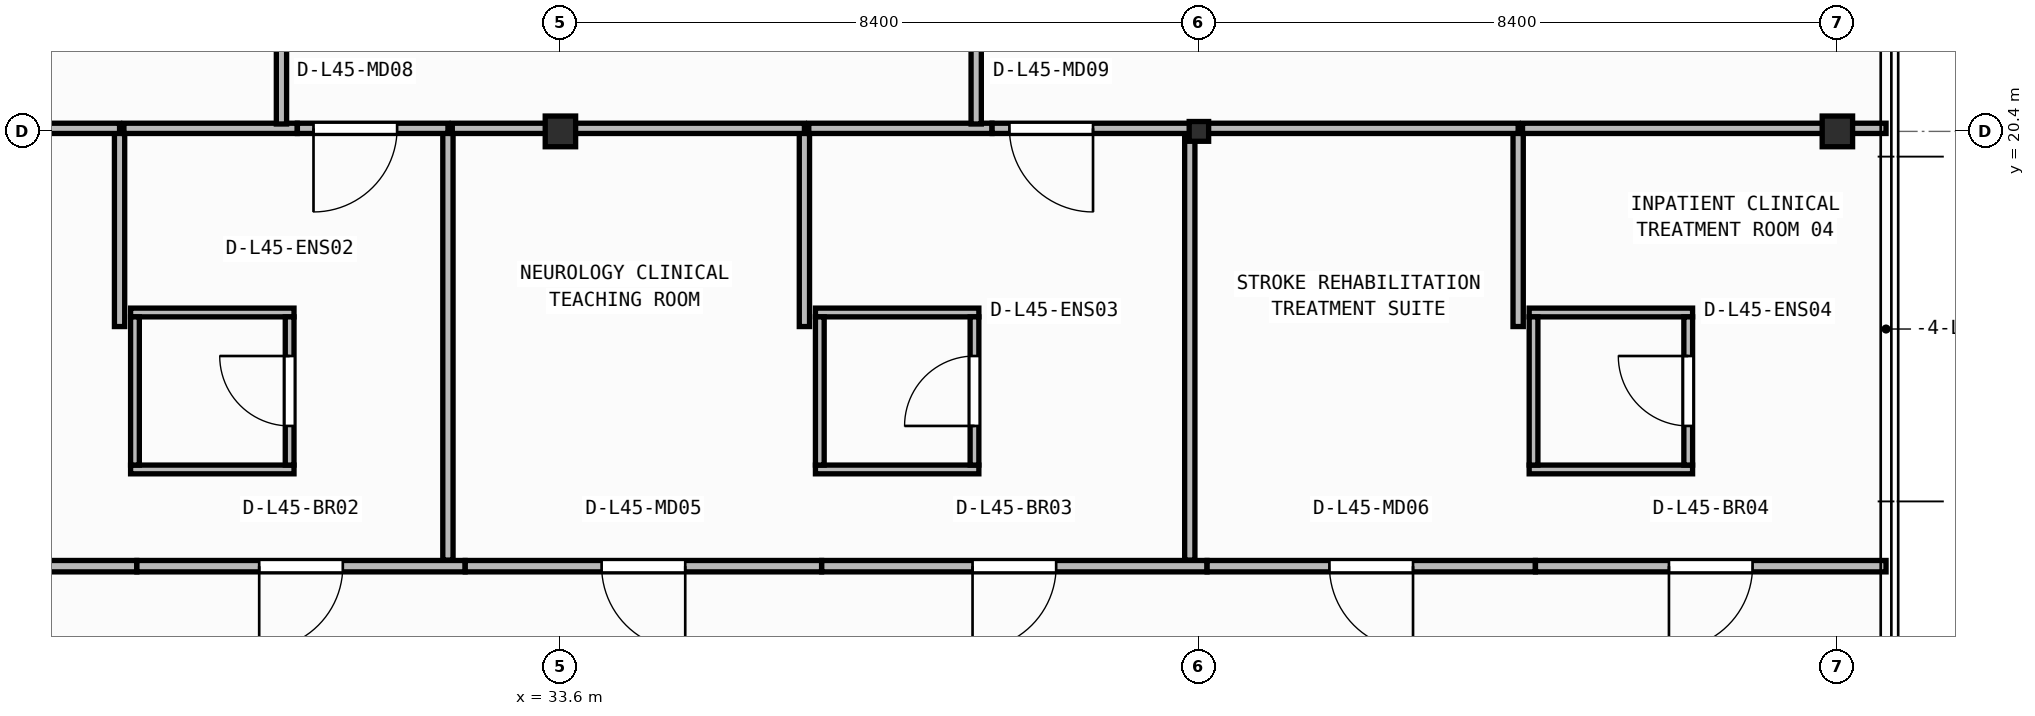
"""IFC4 building model, lengths in metres.
Left out: names, types, materials, properties, quantities, classifications, styles, units other than length and angle.
Written with IfcOpenShell. Run it as: python <this file> out.ifc"""

import sys

from ifc_helpers import new_model, si_unit, direction, frame, frame_2d, origin, origin_2d, place, context, subcontext, project, spatial, rectangle, i_section, extrude, element, fill, save


model = new_model("IFC4")
c1 = context("Model", 3, precision=1e-05, world=origin(), true_north=direction((0.0, 1.0)))
c2 = subcontext(c1, "Body", "Model", "MODEL_VIEW")
j1 = project(units=[si_unit("LENGTHUNIT", "METRE"), si_unit("PLANEANGLEUNIT", "RADIAN")], contexts=[c1])
p1 = place(None, origin())
s1 = spatial("IfcSite", under=j1, at=p1, CompositionType="ELEMENT")
p2 = place(p1, origin())
s2 = spatial("IfcBuilding", under=s1, at=p2, CompositionType="ELEMENT")
p3 = place(p2, frame((0.0, 0.0, 184.2)))
s3 = spatial("IfcBuildingStorey", under=s2, at=p3, CompositionType="ELEMENT", Elevation=184.2)
p4 = place(p3, frame((33.6, 20.4, 0.0), z_axis=(0.0, 0.0, 1.0), x_axis=(1.0, 0.0, 0.0)))
e1 = element("IfcColumn", 1, at=p4, inside=s3, PredefinedType="COLUMN", context=c2, shape_type="SweptSolid", body=[
    extrude(i_section(OverallWidth=0.4, OverallDepth=0.404, WebThickness=0.02, FlangeThickness=0.032, at=origin_2d()), origin(), (0.0, 0.0, 1.0), 3.95),
])
p5 = place(p3, frame((42.0, 20.4, 0.0), z_axis=(0.0, 0.0, 1.0), x_axis=(1.0, 0.0, 0.0)))
e2 = element("IfcColumn", 2, at=p5, inside=s3, PredefinedType="COLUMN", context=c2, shape_type="SweptSolid", body=[
    extrude(i_section(OverallWidth=0.256, OverallDepth=0.26, WebThickness=0.01, FlangeThickness=0.017, FilletRadius=0.013, at=origin_2d()), origin(), (0.0, 0.0, 1.0), 3.95),
])
p6 = place(p3, frame((50.4, 20.4, 0.0), z_axis=(0.0, 0.0, 1.0), x_axis=(1.0, 0.0, 0.0)))
e3 = element("IfcColumn", 3, at=p6, inside=s3, PredefinedType="COLUMN", context=c2, shape_type="SweptSolid", body=[
    extrude(i_section(OverallWidth=0.4, OverallDepth=0.404, WebThickness=0.02, FlangeThickness=0.032, at=origin_2d()), origin(), (0.0, 0.0, 1.0), 3.95),
])
p7 = place(p3, frame((27.945, 15.952, 0.0), z_axis=(0.0, 0.0, 1.0), x_axis=(1.0, 0.0, 0.0)))
e4 = element("IfcWall", 4, at=p7, inside=s3, PredefinedType="PARTITIONING", context=c2, shape_type="SweptSolid", body=[
    extrude(rectangle(XDim=2.15, YDim=0.115, at=frame_2d((1.075, 0.0))), origin(), (0.0, 0.0, 1.0), 3.381),
])
p8 = place(p3, frame((27.945, 18.018, 0.0), z_axis=(0.0, 0.0, 1.0), x_axis=(1.0, 0.0, 0.0)))
e5 = element("IfcWall", 5, at=p8, inside=s3, PredefinedType="PARTITIONING", context=c2, shape_type="SweptSolid", body=[
    extrude(rectangle(XDim=2.15, YDim=0.115, at=frame_2d((1.075, 0.0))), origin(), (0.0, 0.0, 1.0), 3.71),
])
p9 = place(p3, frame((28.002, 16.01, 0.0), z_axis=(0.0, 0.0, 1.0), x_axis=(0.0, 1.0, 0.0)))
e6 = element("IfcWall", 6, at=p9, inside=s3, PredefinedType="PARTITIONING", context=c2, shape_type="SweptSolid", body=[
    extrude(rectangle(XDim=1.95, YDim=0.115, at=frame_2d((0.975, 0.0))), origin(), (0.0, 0.0, 1.0), 3.71),
])
p10 = place(p3, frame((30.038, 16.01, 0.0), z_axis=(0.0, 0.0, 1.0), x_axis=(0.0, 1.0, 0.0)))
e7 = element("IfcWall", 7, at=p10, inside=s3, PredefinedType="PARTITIONING", context=c2, shape_type="SweptSolid", body=[
    extrude(rectangle(XDim=1.95, YDim=0.115, at=frame_2d((0.975, 0.0))), origin(), (0.0, 0.0, 1.0), 3.71),
])
p11 = place(p10, frame((0.515, 0.0, 0.0)))
e8 = element("IfcOpeningElement", 8, at=p11, cuts=e7, PredefinedType="OPENING", context=c2, shape_type="SweptSolid", body=[
    extrude(rectangle(XDim=0.92, YDim=2.1, at=frame_2d((0.46, 1.05))), frame((0.0, 0.067, 0.0), z_axis=(0.0, -1.0, 0.0), x_axis=(1.0, 0.0, 0.0)), (0.0, 0.0, 1.0), 0.135),
])
p12 = place(p3, frame((36.955, 15.952, 0.0), z_axis=(0.0, 0.0, 1.0), x_axis=(1.0, 0.0, 0.0)))
e9 = element("IfcWall", 9, at=p12, inside=s3, PredefinedType="PARTITIONING", context=c2, shape_type="SweptSolid", body=[
    extrude(rectangle(XDim=2.15, YDim=0.115, at=frame_2d((1.075, 0.0))), origin(), (0.0, 0.0, 1.0), 3.381),
])
p13 = place(p3, frame((36.955, 18.018, 0.0), z_axis=(0.0, 0.0, 1.0), x_axis=(1.0, 0.0, 0.0)))
e10 = element("IfcWall", 10, at=p13, inside=s3, PredefinedType="PARTITIONING", context=c2, shape_type="SweptSolid", body=[
    extrude(rectangle(XDim=2.15, YDim=0.115, at=frame_2d((1.075, 0.0))), origin(), (0.0, 0.0, 1.0), 3.71),
])
p14 = place(p3, frame((37.012, 16.01, 0.0), z_axis=(0.0, 0.0, 1.0), x_axis=(0.0, 1.0, 0.0)))
e11 = element("IfcWall", 11, at=p14, inside=s3, PredefinedType="PARTITIONING", context=c2, shape_type="SweptSolid", body=[
    extrude(rectangle(XDim=1.95, YDim=0.115, at=frame_2d((0.975, 0.0))), origin(), (0.0, 0.0, 1.0), 3.71),
])
p15 = place(p3, frame((39.048, 16.01, 0.0), z_axis=(0.0, 0.0, 1.0), x_axis=(0.0, 1.0, 0.0)))
e12 = element("IfcWall", 12, at=p15, inside=s3, PredefinedType="PARTITIONING", context=c2, shape_type="SweptSolid", body=[
    extrude(rectangle(XDim=1.95, YDim=0.115, at=frame_2d((0.975, 0.0))), origin(), (0.0, 0.0, 1.0), 3.71),
])
p16 = place(p15, frame((0.515, 0.0, 0.0)))
e13 = element("IfcOpeningElement", 13, at=p16, cuts=e12, PredefinedType="OPENING", context=c2, shape_type="SweptSolid", body=[
    extrude(rectangle(XDim=0.92, YDim=2.1, at=frame_2d((0.46, 1.05))), frame((0.0, 0.067, 0.0), z_axis=(0.0, -1.0, 0.0), x_axis=(1.0, 0.0, 0.0)), (0.0, 0.0, 1.0), 0.135),
])
p17 = place(p3, frame((46.345, 15.952, 0.0), z_axis=(0.0, 0.0, 1.0), x_axis=(1.0, 0.0, 0.0)))
e14 = element("IfcWall", 14, at=p17, inside=s3, PredefinedType="PARTITIONING", context=c2, shape_type="SweptSolid", body=[
    extrude(rectangle(XDim=2.15, YDim=0.115, at=frame_2d((1.075, 0.0))), origin(), (0.0, 0.0, 1.0), 3.381),
])
p18 = place(p3, frame((46.345, 18.018, 0.0), z_axis=(0.0, 0.0, 1.0), x_axis=(1.0, 0.0, 0.0)))
e15 = element("IfcWall", 15, at=p18, inside=s3, PredefinedType="PARTITIONING", context=c2, shape_type="SweptSolid", body=[
    extrude(rectangle(XDim=2.15, YDim=0.115, at=frame_2d((1.075, 0.0))), origin(), (0.0, 0.0, 1.0), 3.71),
])
p19 = place(p3, frame((46.403, 16.01, 0.0), z_axis=(0.0, 0.0, 1.0), x_axis=(0.0, 1.0, 0.0)))
e16 = element("IfcWall", 16, at=p19, inside=s3, PredefinedType="PARTITIONING", context=c2, shape_type="SweptSolid", body=[
    extrude(rectangle(XDim=1.95, YDim=0.115, at=frame_2d((0.975, 0.0))), origin(), (0.0, 0.0, 1.0), 3.71),
])
p20 = place(p3, frame((48.438, 16.01, 0.0), z_axis=(0.0, 0.0, 1.0), x_axis=(0.0, 1.0, 0.0)))
e17 = element("IfcWall", 17, at=p20, inside=s3, PredefinedType="PARTITIONING", context=c2, shape_type="SweptSolid", body=[
    extrude(rectangle(XDim=1.95, YDim=0.115, at=frame_2d((0.975, 0.0))), origin(), (0.0, 0.0, 1.0), 3.71),
])
p21 = place(p20, frame((0.515, 0.0, 0.0)))
e18 = element("IfcOpeningElement", 18, at=p21, cuts=e17, PredefinedType="OPENING", context=c2, shape_type="SweptSolid", body=[
    extrude(rectangle(XDim=0.92, YDim=2.1, at=frame_2d((0.46, 1.05))), frame((0.0, 0.067, 0.0), z_axis=(0.0, -1.0, 0.0), x_axis=(1.0, 0.0, 0.0)), (0.0, 0.0, 1.0), 0.135),
])
p22 = place(p3, frame((28.026, 14.68, 0.0), z_axis=(0.0, 0.0, 1.0), x_axis=(-1.0, 0.0, 0.0)))
e19 = element("IfcWall", 19, at=p22, inside=s3, PredefinedType="PARTITIONING", context=c2, shape_type="SweptSolid", body=[
    extrude(rectangle(XDim=5.068, YDim=0.15, at=frame_2d((2.534, 0.0))), origin(), (0.0, 0.0, 1.0), 3.71),
])
p23 = place(p22, frame((1.984, 0.0, 0.0)))
e20 = element("IfcOpeningElement", 20, at=p23, cuts=e19, PredefinedType="OPENING", context=c2, shape_type="SweptSolid", body=[
    extrude(rectangle(XDim=1.1, YDim=2.1, at=frame_2d((0.55, 1.05))), frame((0.0, 0.085, 0.0), z_axis=(0.0, -1.0, 0.0), x_axis=(1.0, 0.0, 0.0)), (0.0, 0.0, 1.0), 0.17),
])
p24 = place(p3, frame((32.346, 14.68, 0.0), z_axis=(0.0, 0.0, 1.0), x_axis=(-1.0, 0.0, 0.0)))
e21 = element("IfcWall", 21, at=p24, inside=s3, PredefinedType="PARTITIONING", context=c2, shape_type="SweptSolid", body=[
    extrude(rectangle(XDim=4.318, YDim=0.15, at=frame_2d((2.159, 0.0))), origin(), (0.0, 0.0, 1.0), 3.71),
])
p25 = place(p24, frame((1.609, 0.0, 0.0)))
e22 = element("IfcOpeningElement", 22, at=p25, cuts=e21, PredefinedType="OPENING", context=c2, shape_type="SweptSolid", body=[
    extrude(rectangle(XDim=1.1, YDim=2.1, at=frame_2d((0.55, 1.05))), frame((0.0, 0.085, 0.0), z_axis=(0.0, -1.0, 0.0), x_axis=(1.0, 0.0, 0.0)), (0.0, 0.0, 1.0), 0.17),
])
p26 = place(p3, frame((37.036, 14.68, 0.0), z_axis=(0.0, 0.0, 1.0), x_axis=(-1.0, 0.0, 0.0)))
e23 = element("IfcWall", 23, at=p26, inside=s3, PredefinedType="PARTITIONING", context=c2, shape_type="SweptSolid", body=[
    extrude(rectangle(XDim=4.688, YDim=0.15, at=frame_2d((2.344, 0.0))), origin(), (0.0, 0.0, 1.0), 3.71),
])
p27 = place(p26, frame((1.794, 0.0, 0.0)))
e24 = element("IfcOpeningElement", 24, at=p27, cuts=e23, PredefinedType="OPENING", context=c2, shape_type="SweptSolid", body=[
    extrude(rectangle(XDim=1.1, YDim=2.1, at=frame_2d((0.55, 1.05))), frame((0.0, 0.085, 0.0), z_axis=(0.0, -1.0, 0.0), x_axis=(1.0, 0.0, 0.0)), (0.0, 0.0, 1.0), 0.17),
])
p28 = place(p3, frame((42.106, 14.68, 0.0), z_axis=(0.0, 0.0, 1.0), x_axis=(-1.0, 0.0, 0.0)))
e25 = element("IfcWall", 25, at=p28, inside=s3, PredefinedType="PARTITIONING", context=c2, shape_type="SweptSolid", body=[
    extrude(rectangle(XDim=5.068, YDim=0.15, at=frame_2d((2.534, 0.0))), origin(), (0.0, 0.0, 1.0), 3.71),
])
p29 = place(p28, frame((1.984, 0.0, 0.0)))
e26 = element("IfcOpeningElement", 26, at=p29, cuts=e25, PredefinedType="OPENING", context=c2, shape_type="SweptSolid", body=[
    extrude(rectangle(XDim=1.1, YDim=2.1, at=frame_2d((0.55, 1.05))), frame((0.0, 0.085, 0.0), z_axis=(0.0, -1.0, 0.0), x_axis=(1.0, 0.0, 0.0)), (0.0, 0.0, 1.0), 0.17),
])
p30 = place(p3, frame((46.426, 14.68, 0.0), z_axis=(0.0, 0.0, 1.0), x_axis=(-1.0, 0.0, 0.0)))
e27 = element("IfcWall", 27, at=p30, inside=s3, PredefinedType="PARTITIONING", context=c2, shape_type="SweptSolid", body=[
    extrude(rectangle(XDim=4.318, YDim=0.15, at=frame_2d((2.159, 0.0))), origin(), (0.0, 0.0, 1.0), 3.71),
])
p31 = place(p30, frame((1.609, 0.0, 0.0)))
e28 = element("IfcOpeningElement", 28, at=p31, cuts=e27, PredefinedType="OPENING", context=c2, shape_type="SweptSolid", body=[
    extrude(rectangle(XDim=1.1, YDim=2.1, at=frame_2d((0.55, 1.05))), frame((0.0, 0.085, 0.0), z_axis=(0.0, -1.0, 0.0), x_axis=(1.0, 0.0, 0.0)), (0.0, 0.0, 1.0), 0.17),
])
p32 = place(p3, frame((51.04, 14.68, 0.0), z_axis=(0.0, 0.0, 1.0), x_axis=(-1.0, 0.0, 0.0)))
e29 = element("IfcWall", 29, at=p32, inside=s3, PredefinedType="PARTITIONING", context=c2, shape_type="SweptSolid", body=[
    extrude(rectangle(XDim=4.612, YDim=0.15, at=frame_2d((2.306, 0.0))), origin(), (0.0, 0.0, 1.0), 3.71),
])
p33 = place(p32, frame((1.756, 0.0, 0.0)))
e30 = element("IfcOpeningElement", 30, at=p33, cuts=e29, PredefinedType="OPENING", context=c2, shape_type="SweptSolid", body=[
    extrude(rectangle(XDim=1.1, YDim=2.1, at=frame_2d((0.55, 1.05))), frame((0.0, 0.085, 0.0), z_axis=(0.0, -1.0, 0.0), x_axis=(1.0, 0.0, 0.0)), (0.0, 0.0, 1.0), 0.17),
])
p34 = place(p3, frame((27.8, 17.833, 0.0), z_axis=(0.0, 0.0, 1.0), x_axis=(0.0, 1.0, 0.0)))
e31 = element("IfcWall", 31, at=p34, inside=s3, PredefinedType="PARTITIONING", context=c2, shape_type="SweptSolid", body=[
    extrude(rectangle(XDim=2.607, YDim=0.135, at=frame_2d((1.304, 0.0))), origin(), (0.0, 0.0, 1.0), 3.71),
])
p35 = place(p3, frame((27.8, 20.44, 0.0), z_axis=(0.0, 0.0, 1.0), x_axis=(-1.0, 0.0, 0.0)))
e32 = element("IfcWall", 32, at=p35, inside=s3, PredefinedType="PARTITIONING", context=c2, shape_type="SweptSolid", body=[
    extrude(rectangle(XDim=5.012, YDim=0.135, at=frame_2d((2.506, 0.0))), origin(), (0.0, 0.0, 1.0), 3.152),
])
p36 = place(p3, frame((32.12, 14.76, 0.0), z_axis=(0.0, 0.0, 1.0), x_axis=(0.0, 1.0, 0.0)))
e33 = element("IfcWall", 33, at=p36, inside=s3, PredefinedType="PARTITIONING", context=c2, shape_type="SweptSolid", body=[
    extrude(rectangle(XDim=5.68, YDim=0.135, at=frame_2d((2.84, 0.0))), origin(), (0.0, 0.0, 1.0), 3.71),
])
p37 = place(p3, frame((30.137, 20.44, 0.0), z_axis=(0.0, 0.0, 1.0), x_axis=(-1.0, 0.0, 0.0)))
e34 = element("IfcWall", 34, at=p37, inside=s3, PredefinedType="PARTITIONING", context=c2, shape_type="SweptSolid", body=[
    extrude(rectangle(XDim=2.28, YDim=0.135, at=frame_2d((1.14, 0.0))), origin(), (0.0, 0.0, 1.0), 3.152),
])
p38 = place(p3, frame((32.12, 20.44, 0.0), z_axis=(0.0, 0.0, 1.0), x_axis=(-1.0, 0.0, 0.0)))
e35 = element("IfcWall", 35, at=p38, inside=s3, PredefinedType="PARTITIONING", context=c2, shape_type="SweptSolid", body=[
    extrude(rectangle(XDim=1.981, YDim=0.135, at=frame_2d((0.99, 0.0))), origin(), (0.0, 0.0, 1.0), 3.152),
])
p39 = place(p38, frame((0.668, 0.0, 0.0)))
e36 = element("IfcOpeningElement", 36, at=p39, cuts=e35, PredefinedType="OPENING", context=c2, shape_type="SweptSolid", body=[
    extrude(rectangle(XDim=1.1, YDim=2.1, at=frame_2d((0.55, 1.05))), frame((0.0, 0.077, 0.0), z_axis=(0.0, -1.0, 0.0), x_axis=(1.0, 0.0, 0.0)), (0.0, 0.0, 1.0), 0.155),
])
p40 = place(p3, frame((36.81, 17.833, 0.0), z_axis=(0.0, 0.0, 1.0), x_axis=(0.0, 1.0, 0.0)))
e37 = element("IfcWall", 37, at=p40, inside=s3, PredefinedType="PARTITIONING", context=c2, shape_type="SweptSolid", body=[
    extrude(rectangle(XDim=2.607, YDim=0.135, at=frame_2d((1.304, 0.0))), origin(), (0.0, 0.0, 1.0), 3.71),
])
p41 = place(p3, frame((36.81, 20.44, 0.0), z_axis=(0.0, 0.0, 1.0), x_axis=(-1.0, 0.0, 0.0)))
e38 = element("IfcWall", 38, at=p41, inside=s3, PredefinedType="PARTITIONING", context=c2, shape_type="SweptSolid", body=[
    extrude(rectangle(XDim=4.633, YDim=0.135, at=frame_2d((2.316, 0.0))), origin(), (0.0, 0.0, 1.0), 3.152),
])
p42 = place(p3, frame((41.88, 14.76, 0.0), z_axis=(0.0, 0.0, 1.0), x_axis=(0.0, 1.0, 0.0)))
e39 = element("IfcWall", 39, at=p42, inside=s3, PredefinedType="PARTITIONING", context=c2, shape_type="SweptSolid", body=[
    extrude(rectangle(XDim=5.68, YDim=0.135, at=frame_2d((2.84, 0.0))), origin(), (0.0, 0.0, 1.0), 3.152),
])
p43 = place(p3, frame((39.278, 20.44, 0.0), z_axis=(0.0, 0.0, 1.0), x_axis=(-1.0, 0.0, 0.0)))
e40 = element("IfcWall", 40, at=p43, inside=s3, PredefinedType="PARTITIONING", context=c2, shape_type="SweptSolid", body=[
    extrude(rectangle(XDim=2.41, YDim=0.135, at=frame_2d((1.205, 0.0))), origin(), (0.0, 0.0, 1.0), 3.152),
])
p44 = place(p3, frame((41.88, 20.44, 0.0), z_axis=(0.0, 0.0, 1.0), x_axis=(-1.0, 0.0, 0.0)))
e41 = element("IfcWall", 41, at=p44, inside=s3, PredefinedType="PARTITIONING", context=c2, shape_type="SweptSolid", body=[
    extrude(rectangle(XDim=2.6, YDim=0.135, at=frame_2d((1.3, 0.0))), origin(), (0.0, 0.0, 1.0), 3.152),
])
p45 = place(p44, frame((1.273, 0.0, 0.0)))
e42 = element("IfcOpeningElement", 42, at=p45, cuts=e41, PredefinedType="OPENING", context=c2, shape_type="SweptSolid", body=[
    extrude(rectangle(XDim=1.1, YDim=2.1, at=frame_2d((0.55, 1.05))), frame((0.0, 0.077, 0.0), z_axis=(0.0, -1.0, 0.0), x_axis=(1.0, 0.0, 0.0)), (0.0, 0.0, 1.0), 0.155),
])
p46 = place(p3, frame((46.2, 17.833, 0.0), z_axis=(0.0, 0.0, 1.0), x_axis=(0.0, 1.0, 0.0)))
e43 = element("IfcWall", 43, at=p46, inside=s3, PredefinedType="PARTITIONING", context=c2, shape_type="SweptSolid", body=[
    extrude(rectangle(XDim=2.607, YDim=0.135, at=frame_2d((1.304, 0.0))), origin(), (0.0, 0.0, 1.0), 3.71),
])
p47 = place(p3, frame((46.2, 20.44, 0.0), z_axis=(0.0, 0.0, 1.0), x_axis=(-1.0, 0.0, 0.0)))
e44 = element("IfcWall", 44, at=p47, inside=s3, PredefinedType="PARTITIONING", context=c2, shape_type="SweptSolid", body=[
    extrude(rectangle(XDim=4.262, YDim=0.135, at=frame_2d((2.131, 0.0))), origin(), (0.0, 0.0, 1.0), 3.152),
])
p48 = place(p3, frame((51.04, 20.44, 0.0), z_axis=(0.0, 0.0, 1.0), x_axis=(-1.0, 0.0, 0.0)))
e45 = element("IfcWall", 45, at=p48, inside=s3, PredefinedType="PARTITIONING", context=c2, shape_type="SweptSolid", body=[
    extrude(rectangle(XDim=4.782, YDim=0.135, at=frame_2d((2.391, 0.0))), origin(), (0.0, 0.0, 1.0), 3.152),
])
for number, where, z_axis, x_axis in (
    (46, (29.93, 20.498, 0.0), (0.0, 0.0, 1.0), (0.0, 1.0, 0.0)),
    (47, (39.07, 20.498, 0.0), (0.0, 0.0, 1.0), (0.0, 1.0, 0.0)),
):
    element("IfcWall", number, at=place(p3, frame(where, z_axis=z_axis, x_axis=x_axis)), inside=s3, PredefinedType="PARTITIONING", context=c2, shape_type="SweptSolid", body=[
        extrude(rectangle(XDim=6.642, YDim=0.135, at=frame_2d((3.321, 0.0))), origin(), (0.0, 0.0, 1.0), 3.71),
    ])
p49 = place(p11, origin())
e48 = element("IfcDoor", 48, at=p49, inside=s3, OperationType="SINGLE_SWING_RIGHT", PredefinedType="DOOR", context=c2, shape_type="SweptSolid", body=[
    extrude(rectangle(XDim=0.92, YDim=2.1, at=frame_2d((0.46, 1.05))), frame((0.0, 0.025, 0.0), z_axis=(0.0, -1.0, 0.0), x_axis=(1.0, 0.0, 0.0)), (0.0, 0.0, 1.0), 0.05),
])
fill(e8, e48)
p50 = place(p16, origin())
e49 = element("IfcDoor", 49, at=p50, inside=s3, OperationType="SINGLE_SWING_LEFT", PredefinedType="DOOR", context=c2, shape_type="SweptSolid", body=[
    extrude(rectangle(XDim=0.92, YDim=2.1, at=frame_2d((0.46, 1.05))), frame((0.0, 0.025, 0.0), z_axis=(0.0, -1.0, 0.0), x_axis=(1.0, 0.0, 0.0)), (0.0, 0.0, 1.0), 0.05),
])
fill(e13, e49)
p51 = place(p21, origin())
e50 = element("IfcDoor", 50, at=p51, inside=s3, OperationType="SINGLE_SWING_RIGHT", PredefinedType="DOOR", context=c2, shape_type="SweptSolid", body=[
    extrude(rectangle(XDim=0.92, YDim=2.1, at=frame_2d((0.46, 1.05))), frame((0.0, 0.025, 0.0), z_axis=(0.0, -1.0, 0.0), x_axis=(1.0, 0.0, 0.0)), (0.0, 0.0, 1.0), 0.05),
])
fill(e18, e50)
p52 = place(p25, origin())
e51 = element("IfcDoor", 51, at=p52, inside=s3, OperationType="SINGLE_SWING_RIGHT", PredefinedType="DOOR", context=c2, shape_type="SweptSolid", body=[
    extrude(rectangle(XDim=1.1, YDim=2.1, at=frame_2d((0.55, 1.05))), frame((0.0, 0.025, 0.0), z_axis=(0.0, -1.0, 0.0), x_axis=(1.0, 0.0, 0.0)), (0.0, 0.0, 1.0), 0.05),
])
fill(e22, e51)
p53 = place(p27, origin())
e52 = element("IfcDoor", 52, at=p53, inside=s3, OperationType="SINGLE_SWING_LEFT", PredefinedType="DOOR", context=c2, shape_type="SweptSolid", body=[
    extrude(rectangle(XDim=1.1, YDim=2.1, at=frame_2d((0.55, 1.05))), frame((0.0, 0.025, 0.0), z_axis=(0.0, -1.0, 0.0), x_axis=(1.0, 0.0, 0.0)), (0.0, 0.0, 1.0), 0.05),
])
fill(e24, e52)
p54 = place(p29, origin())
e53 = element("IfcDoor", 53, at=p54, inside=s3, OperationType="SINGLE_SWING_RIGHT", PredefinedType="DOOR", context=c2, shape_type="SweptSolid", body=[
    extrude(rectangle(XDim=1.1, YDim=2.1, at=frame_2d((0.55, 1.05))), frame((0.0, 0.025, 0.0), z_axis=(0.0, -1.0, 0.0), x_axis=(1.0, 0.0, 0.0)), (0.0, 0.0, 1.0), 0.05),
])
fill(e26, e53)
p55 = place(p31, origin())
e54 = element("IfcDoor", 54, at=p55, inside=s3, OperationType="SINGLE_SWING_LEFT", PredefinedType="DOOR", context=c2, shape_type="SweptSolid", body=[
    extrude(rectangle(XDim=1.1, YDim=2.1, at=frame_2d((0.55, 1.05))), frame((0.0, 0.025, 0.0), z_axis=(0.0, -1.0, 0.0), x_axis=(1.0, 0.0, 0.0)), (0.0, 0.0, 1.0), 0.05),
])
fill(e28, e54)
p56 = place(p33, origin())
e55 = element("IfcDoor", 55, at=p56, inside=s3, OperationType="SINGLE_SWING_RIGHT", PredefinedType="DOOR", context=c2, shape_type="SweptSolid", body=[
    extrude(rectangle(XDim=1.1, YDim=2.1, at=frame_2d((0.55, 1.05))), frame((0.0, 0.025, 0.0), z_axis=(0.0, -1.0, 0.0), x_axis=(1.0, 0.0, 0.0)), (0.0, 0.0, 1.0), 0.05),
])
fill(e30, e55)
p57 = place(p39, origin())
e56 = element("IfcDoor", 56, at=p57, inside=s3, OperationType="SINGLE_SWING_RIGHT", PredefinedType="DOOR", context=c2, shape_type="SweptSolid", body=[
    extrude(rectangle(XDim=1.1, YDim=2.1, at=frame_2d((0.55, 1.05))), frame((0.0, 0.025, 0.0), z_axis=(0.0, -1.0, 0.0), x_axis=(1.0, 0.0, 0.0)), (0.0, 0.0, 1.0), 0.05),
])
fill(e36, e56)
p58 = place(p45, origin())
e57 = element("IfcDoor", 57, at=p58, inside=s3, OperationType="SINGLE_SWING_LEFT", PredefinedType="DOOR", context=c2, shape_type="SweptSolid", body=[
    extrude(rectangle(XDim=1.1, YDim=2.1, at=frame_2d((0.55, 1.05))), frame((0.0, 0.025, 0.0), z_axis=(0.0, -1.0, 0.0), x_axis=(1.0, 0.0, 0.0)), (0.0, 0.0, 1.0), 0.05),
])
fill(e42, e57)
save(model, sys.argv[1])
